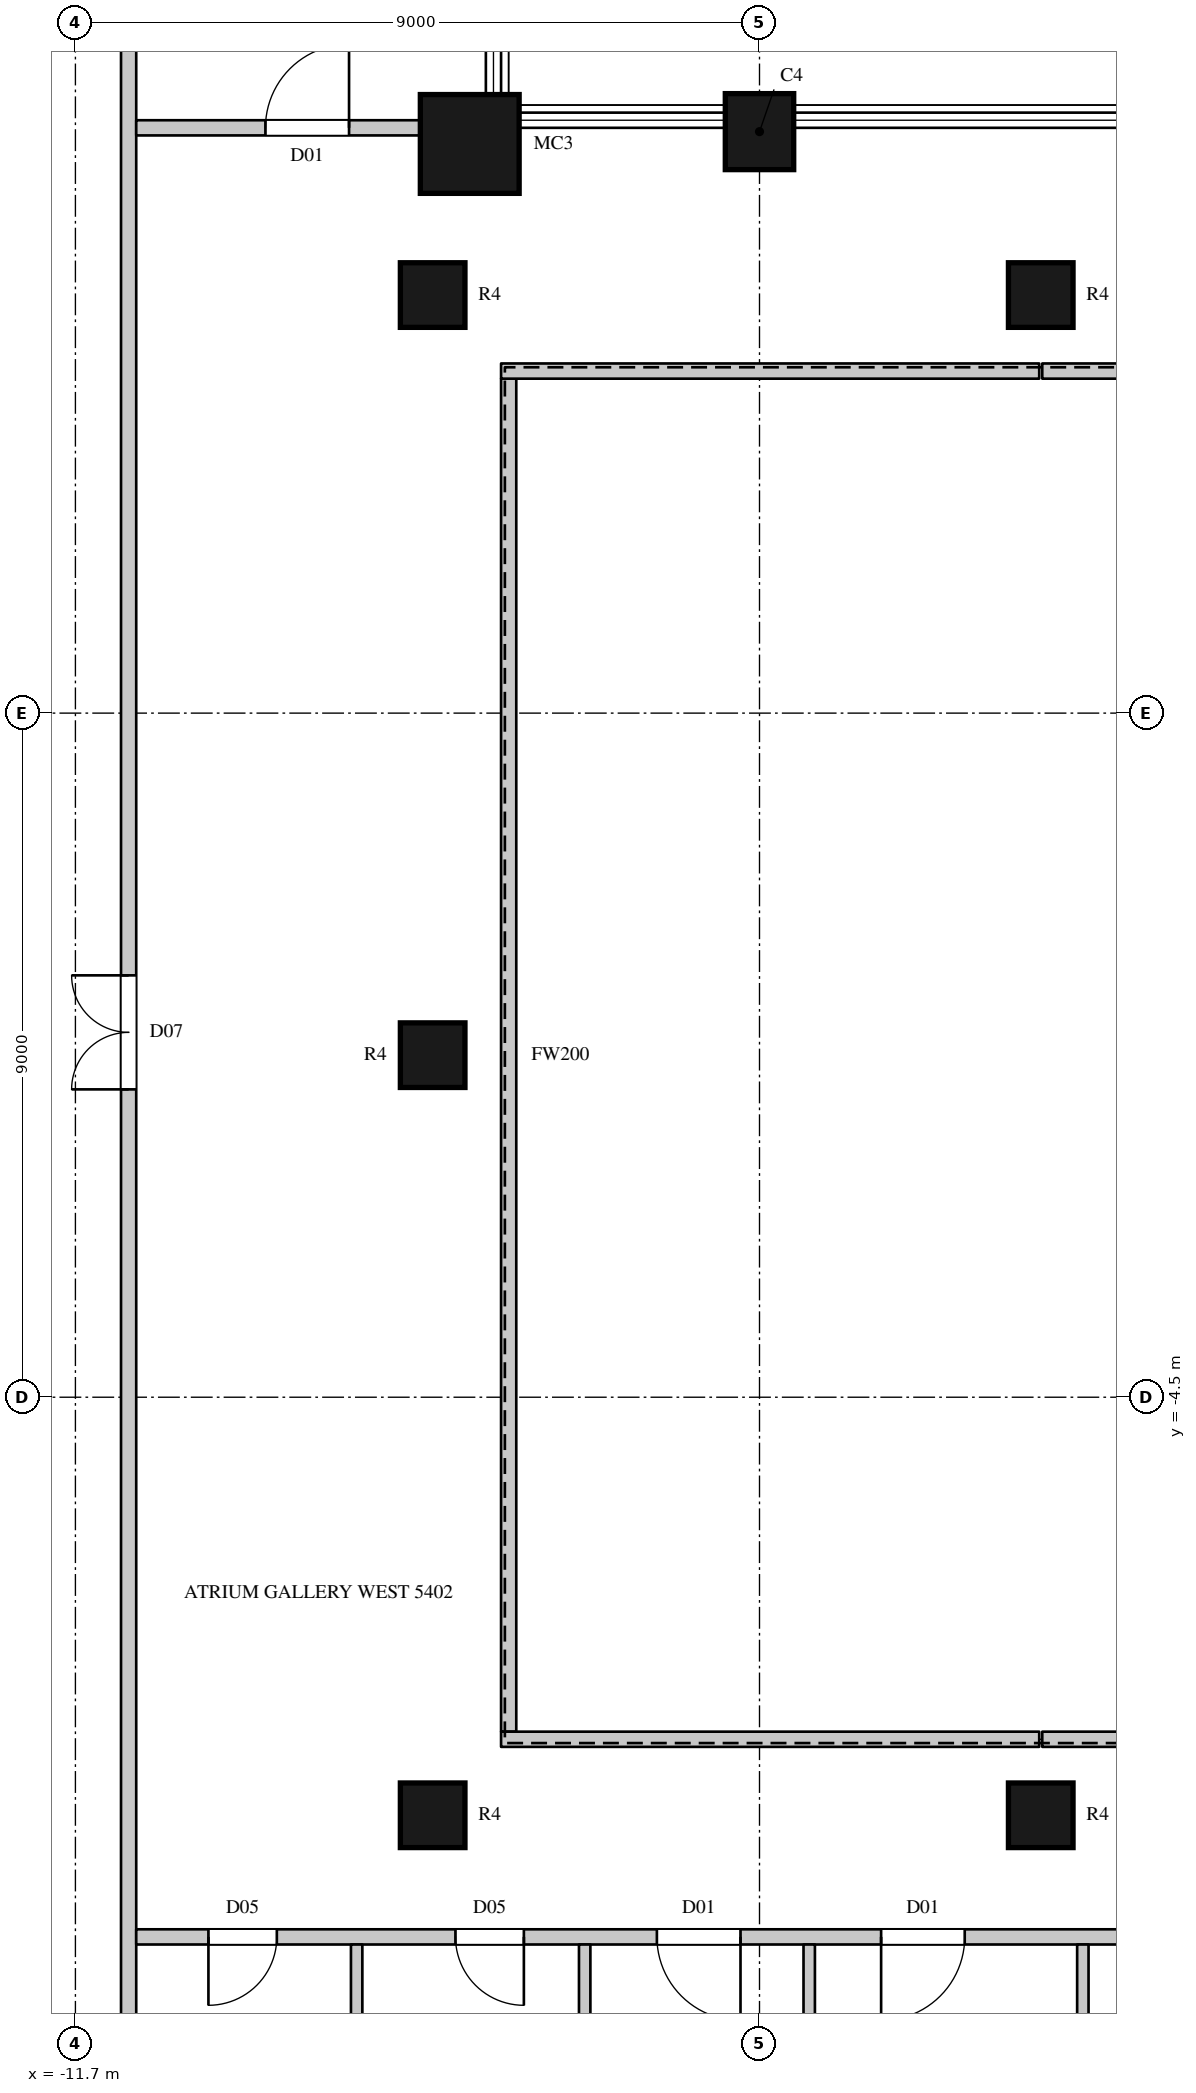
"""IFC4 building model, lengths in metres.
Left out: names, types, materials, properties, quantities, classifications, styles, units other than length and angle.
Written with IfcOpenShell. Run it as: python <this file> out.ifc"""

import sys

from ifc_helpers import new_model, si_unit, direction, frame, frame_2d, origin, origin_2d, place, context, subcontext, project, spatial, rectangle, circle, extrude, element, fill, save


model = new_model("IFC4")
c1 = context("Model", 3, precision=1e-05, world=origin(), true_north=direction((0.0, 1.0)))
c2 = subcontext(c1, "Body", "Model", "MODEL_VIEW")
j1 = project(units=[si_unit("LENGTHUNIT", "METRE"), si_unit("PLANEANGLEUNIT", "RADIAN")], contexts=[c1])
p1 = place(None, origin())
s1 = spatial("IfcSite", under=j1, at=p1, CompositionType="ELEMENT")
p2 = place(p1, origin())
s2 = spatial("IfcBuilding", under=s1, at=p2, CompositionType="ELEMENT")
p3 = place(p2, frame((0.0, 0.0, 243.4)))
s3 = spatial("IfcBuildingStorey", under=s2, at=p3, CompositionType="ELEMENT", Elevation=243.4)
p4 = place(p3, frame((-2.7, 12.15, 0.0), z_axis=(0.0, 0.0, 1.0), x_axis=(-1.0, 0.0, 0.0)))
e1 = element("IfcColumn", 1, at=p4, inside=s3, PredefinedType="COLUMN", context=c2, shape_type="SweptSolid", body=[
    extrude(rectangle(XDim=0.9, YDim=1.0, at=origin_2d()), origin(), (0.0, 0.0, 1.0), 4.1),
])
p5 = place(p3, frame((-6.512, 11.988, 0.0), z_axis=(0.0, 0.0, 1.0), x_axis=(1.0, 0.0, 0.0)))
e2 = element("IfcColumn", 2, at=p5, inside=s3, PredefinedType="COLUMN", context=c2, shape_type="SweptSolid", body=[
    extrude(circle(Radius=0.65, at=origin_2d()), origin(), (0.0, 0.0, 1.0), 4.1),
])
for number, where, z_axis, x_axis in (
    (3, (-7.0, -10.0, 0.0), (0.0, 0.0, 1.0), (1.0, 0.0, 0.0)),
    (4, (-7.0, 0.0, 0.0), (0.0, 0.0, 1.0), (1.0, 0.0, 0.0)),
    (5, (-7.0, 10.0, 0.0), (0.0, 0.0, 1.0), (1.0, 0.0, 0.0)),
    (6, (1.0, -10.0, 0.0), (0.0, 0.0, 1.0), (1.0, 0.0, 0.0)),
    (7, (1.0, 10.0, 0.0), (0.0, 0.0, 1.0), (1.0, 0.0, 0.0)),
):
    element("IfcColumn", number, at=place(p3, frame(where, z_axis=z_axis, x_axis=x_axis)), inside=s3, PredefinedType="COLUMN", context=c2, shape_type="SweptSolid", body=[
        extrude(circle(Radius=0.425, at=origin_2d()), origin(), (0.0, 0.0, 1.0), 4.1),
    ])
p6 = place(p3, frame((-11.0, -14.8, 0.0), z_axis=(0.0, 0.0, 1.0), x_axis=(0.0, 1.0, 0.0)))
e8 = element("IfcWall", 8, at=p6, inside=s3, PredefinedType="PARTITIONING", context=c2, shape_type="SweptSolid", body=[
    extrude(rectangle(XDim=29.6, YDim=0.2, at=frame_2d((14.8, 0.0))), origin(), (0.0, 0.0, 1.0), 3.8),
])
p7 = place(p6, frame((14.35, 0.0, 0.0)))
e9 = element("IfcOpeningElement", 9, at=p7, cuts=e8, PredefinedType="OPENING", context=c2, shape_type="SweptSolid", body=[
    extrude(rectangle(XDim=1.5, YDim=2.4, at=frame_2d((0.75, 1.2))), frame((0.0, 0.11, 0.0), z_axis=(0.0, -1.0, 0.0), x_axis=(1.0, 0.0, 0.0)), (0.0, 0.0, 1.0), 0.22),
])
p8 = place(p3, frame((-10.9, -11.6, 0.0), z_axis=(0.0, 0.0, 1.0), x_axis=(1.0, 0.0, 0.0)))
e10 = element("IfcWall", 10, at=p8, inside=s3, PredefinedType="PARTITIONING", context=c2, shape_type="SweptSolid", body=[
    extrude(rectangle(XDim=21.4, YDim=0.2, at=frame_2d((10.7, 0.0))), origin(), (0.0, 0.0, 1.0), 3.8),
])
p9 = place(p8, frame((0.95, 0.0, 0.0)))
e11 = element("IfcOpeningElement", 11, at=p9, cuts=e10, PredefinedType="OPENING", context=c2, shape_type="SweptSolid", body=[
    extrude(rectangle(XDim=0.9, YDim=2.2, at=frame_2d((0.45, 1.1))), frame((0.0, 0.11, 0.0), z_axis=(0.0, -1.0, 0.0), x_axis=(1.0, 0.0, 0.0)), (0.0, 0.0, 1.0), 0.22),
])
p10 = place(p8, frame((4.2, 0.0, 0.0)))
e12 = element("IfcOpeningElement", 12, at=p10, cuts=e10, PredefinedType="OPENING", context=c2, shape_type="SweptSolid", body=[
    extrude(rectangle(XDim=0.9, YDim=2.2, at=frame_2d((0.45, 1.1))), frame((0.0, 0.11, 0.0), z_axis=(0.0, -1.0, 0.0), x_axis=(1.0, 0.0, 0.0)), (0.0, 0.0, 1.0), 0.22),
])
p11 = place(p8, frame((6.85, 0.0, 0.0)))
e13 = element("IfcOpeningElement", 13, at=p11, cuts=e10, PredefinedType="OPENING", context=c2, shape_type="SweptSolid", body=[
    extrude(rectangle(XDim=1.1, YDim=2.4, at=frame_2d((0.55, 1.2))), frame((0.0, 0.11, 0.0), z_axis=(0.0, -1.0, 0.0), x_axis=(1.0, 0.0, 0.0)), (0.0, 0.0, 1.0), 0.22),
])
p12 = place(p8, frame((9.8, 0.0, 0.0)))
e14 = element("IfcOpeningElement", 14, at=p12, cuts=e10, PredefinedType="OPENING", context=c2, shape_type="SweptSolid", body=[
    extrude(rectangle(XDim=1.1, YDim=2.4, at=frame_2d((0.55, 1.2))), frame((0.0, 0.11, 0.0), z_axis=(0.0, -1.0, 0.0), x_axis=(1.0, 0.0, 0.0)), (0.0, 0.0, 1.0), 0.22),
])
p13 = place(p3, frame((-10.9, 12.2, 0.0), z_axis=(0.0, 0.0, 1.0), x_axis=(1.0, 0.0, 0.0)))
e15 = element("IfcWall", 15, at=p13, inside=s3, PredefinedType="PARTITIONING", context=c2, shape_type="SweptSolid", body=[
    extrude(rectangle(XDim=3.756, YDim=0.2, at=frame_2d((1.878, 0.0))), origin(), (0.0, 0.0, 1.0), 3.8),
])
p14 = place(p13, frame((1.7, 0.0, 0.0)))
e16 = element("IfcOpeningElement", 16, at=p14, cuts=e15, PredefinedType="OPENING", context=c2, shape_type="SweptSolid", body=[
    extrude(rectangle(XDim=1.1, YDim=2.4, at=frame_2d((0.55, 1.2))), frame((0.0, 0.11, 0.0), z_axis=(0.0, -1.0, 0.0), x_axis=(1.0, 0.0, 0.0)), (0.0, 0.0, 1.0), 0.22),
])
p15 = place(p3, frame((-6.0, -8.9, 0.0), z_axis=(0.0, 0.0, 1.0), x_axis=(0.0, 1.0, 0.0)))
e17 = element("IfcWall", 17, at=p15, inside=s3, PredefinedType="PARTITIONING", context=c2, shape_type="SweptSolid", body=[
    extrude(rectangle(XDim=17.8, YDim=0.2, at=frame_2d((8.9, 0.0))), origin(), (0.0, 0.0, 1.0), 3.8),
])
for number, where, z_axis, x_axis in (
    (18, (-6.1, -9.0, 0.0), (0.0, 0.0, 1.0), (1.0, 0.0, 0.0)),
    (19, (-6.1, 9.0, 0.0), (0.0, 0.0, 1.0), (1.0, 0.0, 0.0)),
    (20, (1.02, -9.0, 0.0), (0.0, 0.0, 1.0), (1.0, 0.0, 0.0)),
    (21, (1.02, 9.0, 0.0), (0.0, 0.0, 1.0), (1.0, 0.0, 0.0)),
):
    element("IfcWall", number, at=place(p3, frame(where, z_axis=z_axis, x_axis=x_axis)), inside=s3, PredefinedType="PARTITIONING", context=c2, shape_type="SweptSolid", body=[
        extrude(rectangle(XDim=7.08, YDim=0.2, at=frame_2d((3.54, 0.0))), origin(), (0.0, 0.0, 1.0), 3.8),
    ])
for number, where, z_axis, x_axis in (
    (22, (-8.0, -24.04, 0.0), (0.0, 0.0, 1.0), (0.0, 1.0, 0.0)),
    (23, (-5.0, -24.04, 0.0), (0.0, 0.0, 1.0), (0.0, 1.0, 0.0)),
):
    element("IfcWall", number, at=place(p3, frame(where, z_axis=z_axis, x_axis=x_axis)), inside=s3, PredefinedType="PARTITIONING", context=c2, shape_type="SweptSolid", body=[
        extrude(rectangle(XDim=12.34, YDim=0.15, at=frame_2d((6.17, 0.0))), origin(), (0.0, 0.0, 1.0), 3.8),
    ])
p16 = place(p3, frame((-2.046, -23.441, 0.0), z_axis=(0.0, 0.0, 1.0), x_axis=(0.0, 1.0, 0.0)))
e24 = element("IfcWall", 24, at=p16, inside=s3, PredefinedType="PARTITIONING", context=c2, shape_type="SweptSolid", body=[
    extrude(rectangle(XDim=11.741, YDim=0.15, at=frame_2d((5.871, 0.0))), origin(), (0.0, 0.0, 1.0), 3.8),
])
p17 = place(p3, frame((1.554, -15.425, 0.0), z_axis=(0.0, 0.0, 1.0), x_axis=(0.0, 1.0, 0.0)))
e25 = element("IfcWall", 25, at=p17, inside=s3, PredefinedType="PARTITIONING", context=c2, shape_type="SweptSolid", body=[
    extrude(rectangle(XDim=3.725, YDim=0.15, at=frame_2d((1.863, 0.0))), origin(), (0.0, 0.0, 1.0), 3.8),
])
p18 = place(p17, frame((0.15, 0.0, 0.0)))
e26 = element("IfcOpeningElement", 26, at=p18, cuts=e25, PredefinedType="OPENING", context=c2, shape_type="SweptSolid", body=[
    extrude(rectangle(XDim=0.95, YDim=2.2, at=frame_2d((0.475, 1.1))), frame((0.0, 0.085, 0.0), z_axis=(0.0, -1.0, 0.0), x_axis=(1.0, 0.0, 0.0)), (0.0, 0.0, 1.0), 0.17),
])
p19 = place(p7, origin())
e27 = element("IfcDoor", 27, at=p19, inside=s3, OperationType="DOUBLE_DOOR_SINGLE_SWING", PredefinedType="DOOR", context=c2, shape_type="SweptSolid", body=[
    extrude(rectangle(XDim=1.5, YDim=2.4, at=frame_2d((0.75, 1.2))), frame((0.0, 0.025, 0.0), z_axis=(0.0, -1.0, 0.0), x_axis=(1.0, 0.0, 0.0)), (0.0, 0.0, 1.0), 0.05),
])
fill(e9, e27)
p20 = place(p9, origin())
e28 = element("IfcDoor", 28, at=p20, inside=s3, OperationType="SINGLE_SWING_RIGHT", PredefinedType="DOOR", context=c2, shape_type="SweptSolid", body=[
    extrude(rectangle(XDim=0.9, YDim=2.2, at=frame_2d((0.45, 1.1))), frame((0.0, 0.025, 0.0), z_axis=(0.0, -1.0, 0.0), x_axis=(1.0, 0.0, 0.0)), (0.0, 0.0, 1.0), 0.05),
])
fill(e11, e28)
p21 = place(p10, origin())
e29 = element("IfcDoor", 29, at=p21, inside=s3, OperationType="SINGLE_SWING_LEFT", PredefinedType="DOOR", context=c2, shape_type="SweptSolid", body=[
    extrude(rectangle(XDim=0.9, YDim=2.2, at=frame_2d((0.45, 1.1))), frame((0.0, 0.025, 0.0), z_axis=(0.0, -1.0, 0.0), x_axis=(1.0, 0.0, 0.0)), (0.0, 0.0, 1.0), 0.05),
])
fill(e12, e29)
p22 = place(p14, origin())
e30 = element("IfcDoor", 30, at=p22, inside=s3, OperationType="SINGLE_SWING_RIGHT", PredefinedType="DOOR", context=c2, shape_type="SweptSolid", body=[
    extrude(rectangle(XDim=1.1, YDim=2.4, at=frame_2d((0.55, 1.2))), frame((0.0, 0.025, 0.0), z_axis=(0.0, -1.0, 0.0), x_axis=(1.0, 0.0, 0.0)), (0.0, 0.0, 1.0), 0.05),
])
fill(e16, e30)
p23 = place(p11, origin())
e31 = element("IfcDoor", 31, at=p23, inside=s3, OperationType="SINGLE_SWING_LEFT", PredefinedType="DOOR", context=c2, shape_type="SweptSolid", body=[
    extrude(rectangle(XDim=1.1, YDim=2.4, at=frame_2d((0.55, 1.2))), frame((0.0, 0.025, 0.0), z_axis=(0.0, -1.0, 0.0), x_axis=(1.0, 0.0, 0.0)), (0.0, 0.0, 1.0), 0.05),
])
fill(e13, e31)
p24 = place(p12, origin())
e32 = element("IfcDoor", 32, at=p24, inside=s3, OperationType="SINGLE_SWING_RIGHT", PredefinedType="DOOR", context=c2, shape_type="SweptSolid", body=[
    extrude(rectangle(XDim=1.1, YDim=2.4, at=frame_2d((0.55, 1.2))), frame((0.0, 0.025, 0.0), z_axis=(0.0, -1.0, 0.0), x_axis=(1.0, 0.0, 0.0)), (0.0, 0.0, 1.0), 0.05),
])
fill(e14, e32)
save(model, sys.argv[1])
